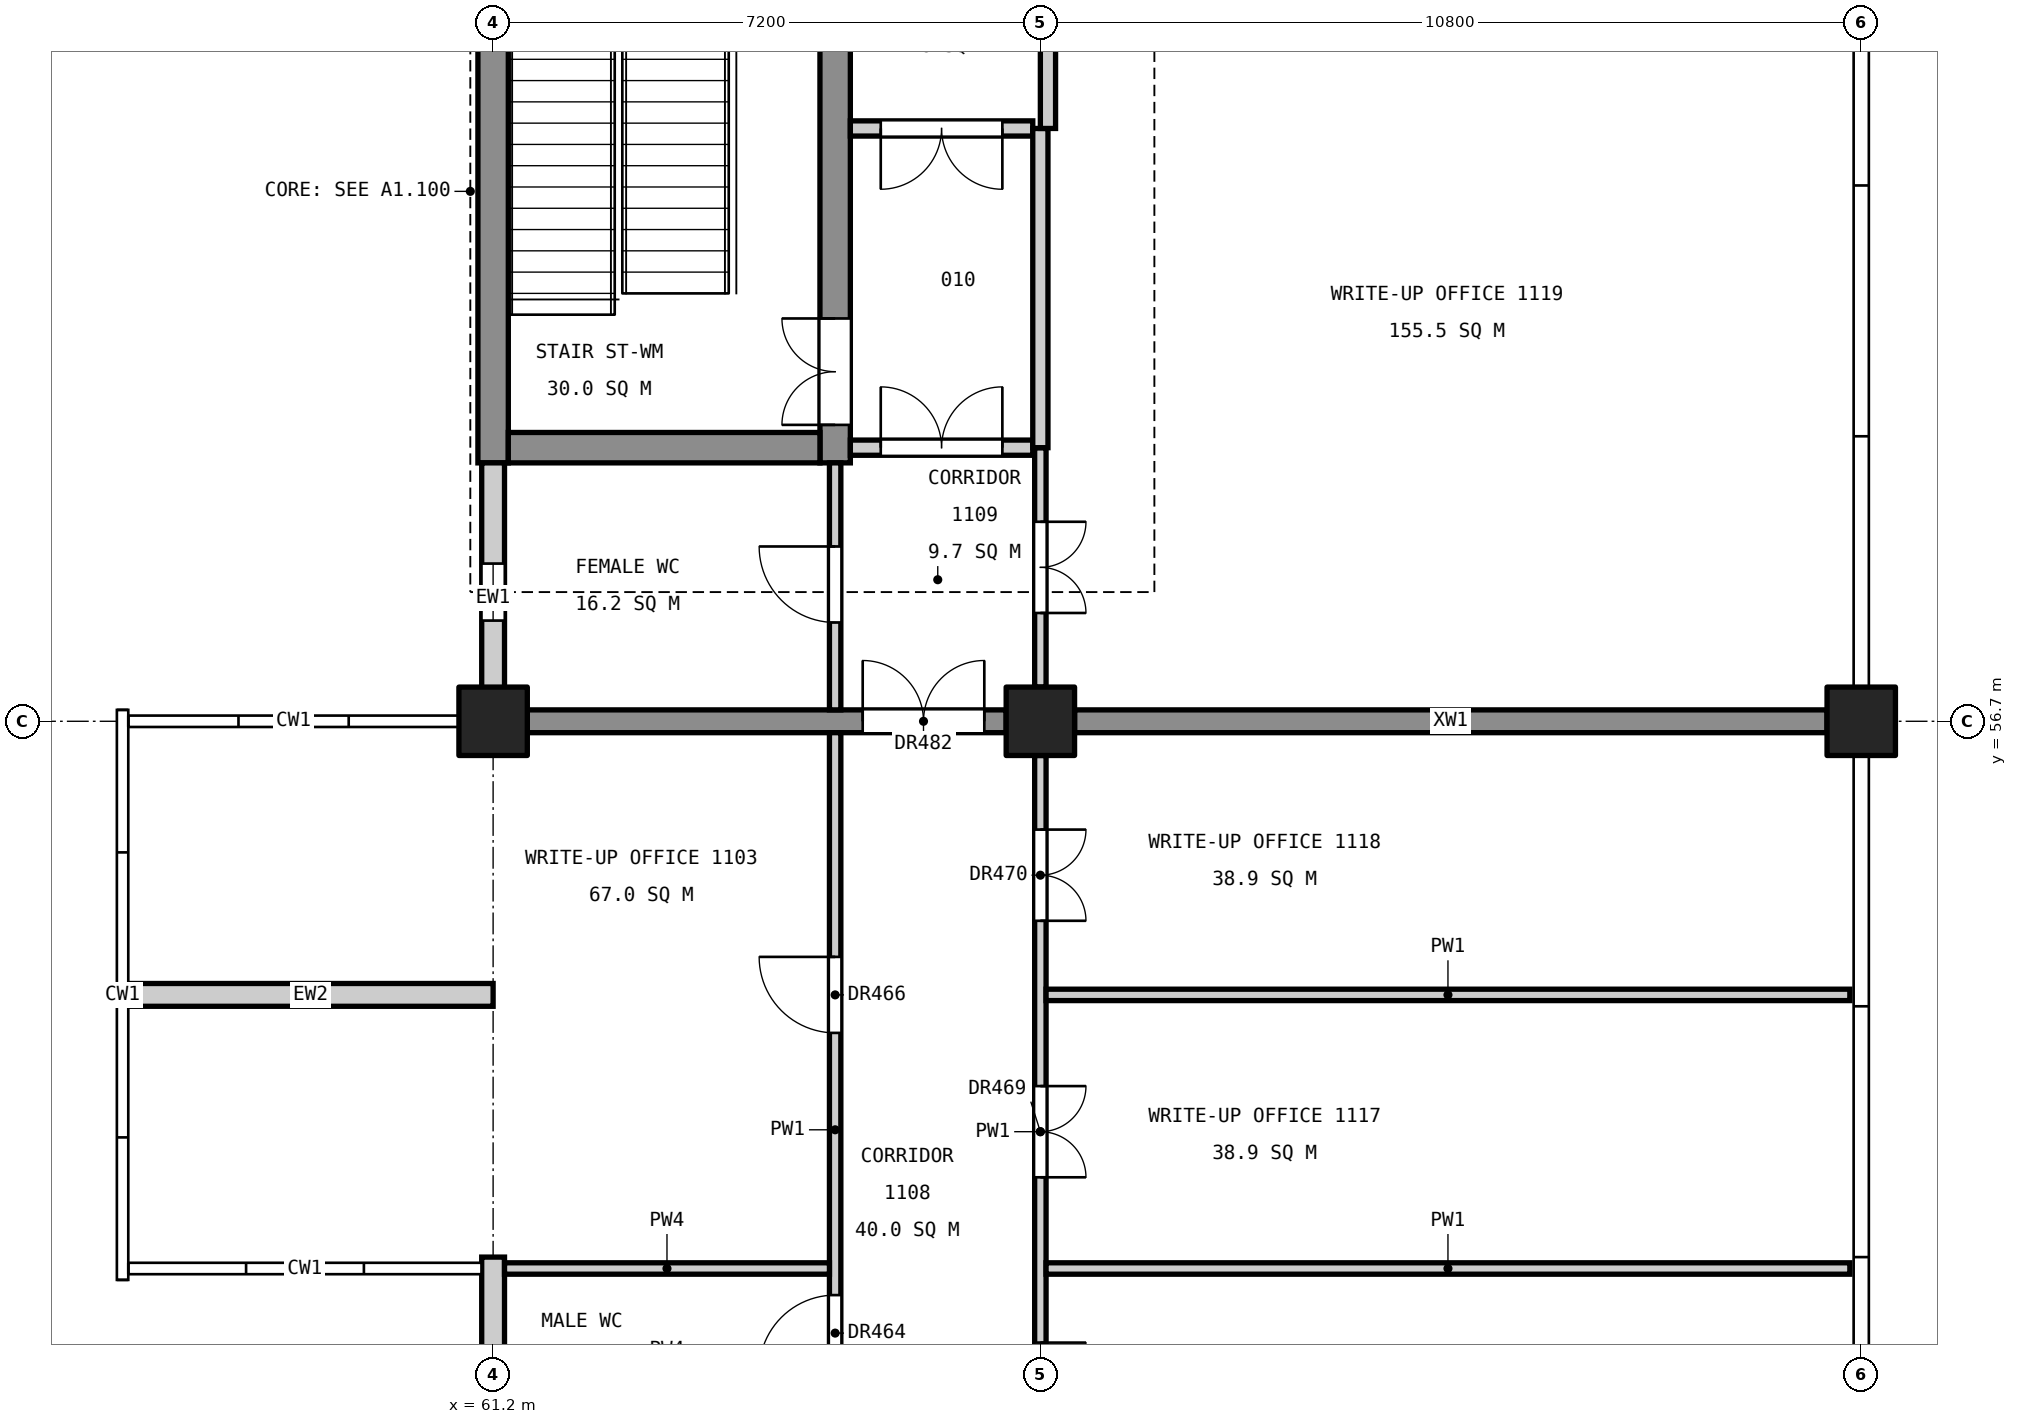
"""IFC4 building model, lengths in metres.
Left out: names, types, materials, properties, quantities, classifications, styles, units other than length and angle.
Written with IfcOpenShell. Run it as: python <this file> out.ifc"""

import sys

from ifc_helpers import new_model, si_unit, direction, frame, frame_2d, origin, origin_2d, place, context, subcontext, project, spatial, rectangle, extrude, element, fill, save


model = new_model("IFC4")
c1 = context("Model", 3, precision=1e-05, world=origin(), true_north=direction((0.0, 1.0)))
c2 = subcontext(c1, "Body", "Model", "MODEL_VIEW")
j1 = project(units=[si_unit("LENGTHUNIT", "METRE"), si_unit("PLANEANGLEUNIT", "RADIAN")], contexts=[c1])
p1 = place(None, origin())
s1 = spatial("IfcSite", under=j1, at=p1, CompositionType="ELEMENT")
p2 = place(p1, origin())
s2 = spatial("IfcBuilding", under=s1, at=p2, CompositionType="ELEMENT")
p3 = place(p2, frame((0.0, 0.0, 55.8)))
s3 = spatial("IfcBuildingStorey", under=s2, at=p3, CompositionType="ELEMENT", Elevation=55.8)
for number, where, z_axis, x_axis in (
    (1, (61.2, 56.7, 0.0), (0.0, 0.0, 1.0), (1.0, 0.0, 0.0)),
    (2, (68.4, 56.7, 0.0), (0.0, 0.0, 1.0), (1.0, 0.0, 0.0)),
    (3, (79.2, 56.7, 0.0), (0.0, 0.0, 1.0), (1.0, 0.0, 0.0)),
):
    element("IfcColumn", number, at=place(p3, frame(where, z_axis=z_axis, x_axis=x_axis)), inside=s3, PredefinedType="COLUMN", context=c2, shape_type="SweptSolid", body=[
        extrude(rectangle(XDim=0.9, YDim=0.9, at=origin_2d()), origin(), (0.0, 0.0, 1.0), 4.8),
    ])
p4 = place(p3, frame((61.2, 60.1, 0.0), z_axis=(0.0, 0.0, 1.0), x_axis=(0.0, 1.0, 0.0)))
e4 = element("IfcWall", 4, at=p4, inside=s3, PredefinedType="SHEAR", context=c2, shape_type="SweptSolid", body=[
    extrude(rectangle(XDim=14.8, YDim=0.4, at=frame_2d((7.4, 0.0))), origin(), (0.0, 0.0, 1.0), 4.55),
])
p5 = place(p4, frame((6.11, 0.0, 3.4)))
e5 = element("IfcOpeningElement", 5, at=p5, cuts=e4, PredefinedType="OPENING", context=c2, shape_type="SweptSolid", body=[
    extrude(rectangle(XDim=1.2, YDim=0.9, at=frame_2d((0.6, 0.45))), frame((0.0, 0.21, 0.0), z_axis=(0.0, -1.0, 0.0), x_axis=(1.0, 0.0, 0.0)), (0.0, 0.0, 1.0), 0.42),
])
p6 = place(p3, frame((65.7, 60.1, 0.0), z_axis=(0.0, 0.0, 1.0), x_axis=(0.0, 1.0, 0.0)))
e6 = element("IfcWall", 6, at=p6, inside=s3, PredefinedType="SHEAR", context=c2, shape_type="SweptSolid", body=[
    extrude(rectangle(XDim=14.8, YDim=0.4, at=frame_2d((7.4, 0.0))), origin(), (0.0, 0.0, 1.0), 4.55),
])
p7 = place(p6, frame((0.5, 0.0, 0.0)))
e7 = element("IfcOpeningElement", 7, at=p7, cuts=e6, PredefinedType="OPENING", context=c2, shape_type="SweptSolid", body=[
    extrude(rectangle(XDim=1.4, YDim=2.1, at=frame_2d((0.7, 1.05))), frame((0.0, 0.21, 0.0), z_axis=(0.0, -1.0, 0.0), x_axis=(1.0, 0.0, 0.0)), (0.0, 0.0, 1.0), 0.42),
])
p8 = place(p6, frame((8.8, 0.0, 0.0)))
e8 = element("IfcOpeningElement", 8, at=p8, cuts=e6, PredefinedType="OPENING", context=c2, shape_type="SweptSolid", body=[
    extrude(rectangle(XDim=1.1, YDim=2.1, at=frame_2d((0.55, 1.05))), frame((0.0, 0.21, 0.0), z_axis=(0.0, -1.0, 0.0), x_axis=(1.0, 0.0, 0.0)), (0.0, 0.0, 1.0), 0.42),
])
p9 = place(p6, frame((11.35, 0.0, 0.0)))
e9 = element("IfcOpeningElement", 9, at=p9, cuts=e6, PredefinedType="OPENING", context=c2, shape_type="SweptSolid", body=[
    extrude(rectangle(XDim=1.1, YDim=2.1, at=frame_2d((0.55, 1.05))), frame((0.0, 0.21, 0.0), z_axis=(0.0, -1.0, 0.0), x_axis=(1.0, 0.0, 0.0)), (0.0, 0.0, 1.0), 0.42),
])
p10 = place(p3, frame((61.4, 60.3, 0.0), z_axis=(0.0, 0.0, 1.0), x_axis=(1.0, 0.0, 0.0)))
e10 = element("IfcWall", 10, at=p10, inside=s3, PredefinedType="SHEAR", context=c2, shape_type="SweptSolid", body=[
    extrude(rectangle(XDim=4.1, YDim=0.4, at=frame_2d((2.05, 0.0))), origin(), (0.0, 0.0, 1.0), 4.55),
])
p11 = place(p3, frame((61.65, 56.7, 0.0), z_axis=(0.0, 0.0, 1.0), x_axis=(1.0, 0.0, 0.0)))
e11 = element("IfcWall", 11, at=p11, inside=s3, PredefinedType="SHEAR", context=c2, shape_type="SweptSolid", body=[
    extrude(rectangle(XDim=6.3, YDim=0.3, at=frame_2d((3.15, 0.0))), origin(), (0.0, 0.0, 1.0), 4.55),
])
p12 = place(p11, frame((4.413, 0.0, 0.0)))
e12 = element("IfcOpeningElement", 12, at=p12, cuts=e11, PredefinedType="OPENING", context=c2, shape_type="SweptSolid", body=[
    extrude(rectangle(XDim=1.6, YDim=2.1, at=frame_2d((0.8, 1.05))), frame((0.0, 0.16, 0.0), z_axis=(0.0, -1.0, 0.0), x_axis=(1.0, 0.0, 0.0)), (0.0, 0.0, 1.0), 0.32),
])
p13 = place(p3, frame((68.85, 56.7, 0.0), z_axis=(0.0, 0.0, 1.0), x_axis=(1.0, 0.0, 0.0)))
e13 = element("IfcWall", 13, at=p13, inside=s3, PredefinedType="SHEAR", context=c2, shape_type="SweptSolid", body=[
    extrude(rectangle(XDim=9.9, YDim=0.3, at=frame_2d((4.95, 0.0))), origin(), (0.0, 0.0, 1.0), 4.55),
])
p14 = place(p3, frame((61.2, 46.1, 0.0), z_axis=(0.0, 0.0, 1.0), x_axis=(0.0, 1.0, 0.0)))
e14 = element("IfcWall", 14, at=p14, inside=s3, PredefinedType="STANDARD", context=c2, shape_type="SweptSolid", body=[
    extrude(rectangle(XDim=3.55, YDim=0.3, at=frame_2d((1.775, 0.0))), origin(), (0.0, 0.0, 1.0), 3.65),
])
p15 = place(p3, frame((61.2, 56.55, 0.0), z_axis=(0.0, 0.0, 1.0), x_axis=(0.0, 1.0, 0.0)))
e15 = element("IfcWall", 15, at=p15, inside=s3, PredefinedType="STANDARD", context=c2, shape_type="SweptSolid", body=[
    extrude(rectangle(XDim=3.55, YDim=0.3, at=frame_2d((1.775, 0.0))), origin(), (0.0, 0.0, 1.0), 3.65),
])
p16 = place(p15, frame((1.475, 0.0, 0.8)))
e16 = element("IfcOpeningElement", 16, at=p16, cuts=e15, PredefinedType="OPENING", context=c2, shape_type="SweptSolid", body=[
    extrude(rectangle(XDim=0.75, YDim=1.2, at=frame_2d((0.375, 0.6))), frame((0.0, 0.16, 0.0), z_axis=(0.0, -1.0, 0.0), x_axis=(1.0, 0.0, 0.0)), (0.0, 0.0, 1.0), 0.32),
])
p17 = place(p3, frame((56.4, 53.1, 0.0), z_axis=(0.0, 0.0, 1.0), x_axis=(1.0, 0.0, 0.0)))
e17 = element("IfcWall", 17, at=p17, inside=s3, PredefinedType="STANDARD", context=c2, shape_type="SweptSolid", body=[
    extrude(rectangle(XDim=4.8, YDim=0.3, at=frame_2d((2.4, 0.0))), origin(), (0.0, 0.0, 1.0), 3.65),
])
p18 = place(p3, frame((65.7, 46.1, 0.0), z_axis=(0.0, 0.0, 1.0), x_axis=(0.0, 1.0, 0.0)))
e18 = element("IfcWall", 18, at=p18, inside=s3, PredefinedType="PARTITIONING", context=c2, shape_type="SweptSolid", body=[
    extrude(rectangle(XDim=10.45, YDim=0.15, at=frame_2d((5.225, 0.0))), origin(), (0.0, 0.0, 1.0), 3.55),
])
p19 = place(p18, frame((0.25, 0.0, 0.0)))
e19 = element("IfcOpeningElement", 19, at=p19, cuts=e18, PredefinedType="OPENING", context=c2, shape_type="SweptSolid", body=[
    extrude(rectangle(XDim=1.0, YDim=2.1, at=frame_2d((0.5, 1.05))), frame((0.0, 0.085, 0.0), z_axis=(0.0, -1.0, 0.0), x_axis=(1.0, 0.0, 0.0)), (0.0, 0.0, 1.0), 0.17),
])
p20 = place(p18, frame((2.05, 0.0, 0.0)))
e20 = element("IfcOpeningElement", 20, at=p20, cuts=e18, PredefinedType="OPENING", context=c2, shape_type="SweptSolid", body=[
    extrude(rectangle(XDim=1.0, YDim=2.1, at=frame_2d((0.5, 1.05))), frame((0.0, 0.085, 0.0), z_axis=(0.0, -1.0, 0.0), x_axis=(1.0, 0.0, 0.0)), (0.0, 0.0, 1.0), 0.17),
])
p21 = place(p18, frame((6.5, 0.0, 0.0)))
e21 = element("IfcOpeningElement", 21, at=p21, cuts=e18, PredefinedType="OPENING", context=c2, shape_type="SweptSolid", body=[
    extrude(rectangle(XDim=1.0, YDim=2.1, at=frame_2d((0.5, 1.05))), frame((0.0, 0.085, 0.0), z_axis=(0.0, -1.0, 0.0), x_axis=(1.0, 0.0, 0.0)), (0.0, 0.0, 1.0), 0.17),
])
p22 = place(p3, frame((65.7, 56.85, 0.0), z_axis=(0.0, 0.0, 1.0), x_axis=(0.0, 1.0, 0.0)))
e22 = element("IfcWall", 22, at=p22, inside=s3, PredefinedType="PARTITIONING", context=c2, shape_type="SweptSolid", body=[
    extrude(rectangle(XDim=3.25, YDim=0.15, at=frame_2d((1.625, 0.0))), origin(), (0.0, 0.0, 1.0), 3.55),
])
p23 = place(p22, frame((1.15, 0.0, 0.0)))
e23 = element("IfcOpeningElement", 23, at=p23, cuts=e22, PredefinedType="OPENING", context=c2, shape_type="SweptSolid", body=[
    extrude(rectangle(XDim=1.0, YDim=2.1, at=frame_2d((0.5, 1.05))), frame((0.0, 0.085, 0.0), z_axis=(0.0, -1.0, 0.0), x_axis=(1.0, 0.0, 0.0)), (0.0, 0.0, 1.0), 0.17),
])
p24 = place(p3, frame((61.35, 49.5, 0.0), z_axis=(0.0, 0.0, 1.0), x_axis=(1.0, 0.0, 0.0)))
e24 = element("IfcWall", 24, at=p24, inside=s3, PredefinedType="PARTITIONING", context=c2, shape_type="SweptSolid", body=[
    extrude(rectangle(XDim=4.275, YDim=0.15, at=frame_2d((2.137, 0.0))), origin(), (0.0, 0.0, 1.0), 3.85),
])
p25 = place(p3, frame((65.9, 60.3, 0.0), z_axis=(0.0, 0.0, 1.0), x_axis=(1.0, 0.0, 0.0)))
e25 = element("IfcWall", 25, at=p25, inside=s3, PredefinedType="PARTITIONING", context=c2, shape_type="SweptSolid", body=[
    extrude(rectangle(XDim=2.4, YDim=0.2, at=frame_2d((1.2, 0.0))), origin(), (0.0, 0.0, 1.0), 3.85),
])
p26 = place(p25, frame((0.4, 0.0, 0.0)))
e26 = element("IfcOpeningElement", 26, at=p26, cuts=e25, PredefinedType="OPENING", context=c2, shape_type="SweptSolid", body=[
    extrude(rectangle(XDim=1.6, YDim=2.1, at=frame_2d((0.8, 1.05))), frame((0.0, 0.11, 0.0), z_axis=(0.0, -1.0, 0.0), x_axis=(1.0, 0.0, 0.0)), (0.0, 0.0, 1.0), 0.22),
])
p27 = place(p3, frame((65.9, 64.5, 0.0), z_axis=(0.0, 0.0, 1.0), x_axis=(1.0, 0.0, 0.0)))
e27 = element("IfcWall", 27, at=p27, inside=s3, PredefinedType="PARTITIONING", context=c2, shape_type="SweptSolid", body=[
    extrude(rectangle(XDim=2.4, YDim=0.2, at=frame_2d((1.2, 0.0))), origin(), (0.0, 0.0, 1.0), 3.55),
])
p28 = place(p27, frame((0.4, 0.0, 0.0)))
e28 = element("IfcOpeningElement", 28, at=p28, cuts=e27, PredefinedType="OPENING", context=c2, shape_type="SweptSolid", body=[
    extrude(rectangle(XDim=1.6, YDim=2.1, at=frame_2d((0.8, 1.05))), frame((0.0, 0.11, 0.0), z_axis=(0.0, -1.0, 0.0), x_axis=(1.0, 0.0, 0.0)), (0.0, 0.0, 1.0), 0.22),
])
p29 = place(p3, frame((68.4, 46.35, 0.0), z_axis=(0.0, 0.0, 1.0), x_axis=(0.0, 1.0, 0.0)))
e29 = element("IfcWall", 29, at=p29, inside=s3, PredefinedType="PARTITIONING", context=c2, shape_type="SweptSolid", body=[
    extrude(rectangle(XDim=9.9, YDim=0.15, at=frame_2d((4.95, 0.0))), origin(), (0.0, 0.0, 1.0), 3.55),
])
p30 = place(p29, frame((0.975, 0.0, 0.0)))
e30 = element("IfcOpeningElement", 30, at=p30, cuts=e29, PredefinedType="OPENING", context=c2, shape_type="SweptSolid", body=[
    extrude(rectangle(XDim=1.2, YDim=2.1, at=frame_2d((0.6, 1.05))), frame((0.0, 0.085, 0.0), z_axis=(0.0, -1.0, 0.0), x_axis=(1.0, 0.0, 0.0)), (0.0, 0.0, 1.0), 0.17),
])
p31 = place(p29, frame((4.35, 0.0, 0.0)))
e31 = element("IfcOpeningElement", 31, at=p31, cuts=e29, PredefinedType="OPENING", context=c2, shape_type="SweptSolid", body=[
    extrude(rectangle(XDim=1.2, YDim=2.1, at=frame_2d((0.6, 1.05))), frame((0.0, 0.085, 0.0), z_axis=(0.0, -1.0, 0.0), x_axis=(1.0, 0.0, 0.0)), (0.0, 0.0, 1.0), 0.17),
])
p32 = place(p29, frame((7.725, 0.0, 0.0)))
e32 = element("IfcOpeningElement", 32, at=p32, cuts=e29, PredefinedType="OPENING", context=c2, shape_type="SweptSolid", body=[
    extrude(rectangle(XDim=1.2, YDim=2.1, at=frame_2d((0.6, 1.05))), frame((0.0, 0.085, 0.0), z_axis=(0.0, -1.0, 0.0), x_axis=(1.0, 0.0, 0.0)), (0.0, 0.0, 1.0), 0.17),
])
p33 = place(p3, frame((68.4, 57.15, 0.0), z_axis=(0.0, 0.0, 1.0), x_axis=(0.0, 1.0, 0.0)))
e33 = element("IfcWall", 33, at=p33, inside=s3, PredefinedType="PARTITIONING", context=c2, shape_type="SweptSolid", body=[
    extrude(rectangle(XDim=3.15, YDim=0.15, at=frame_2d((1.575, 0.0))), origin(), (0.0, 0.0, 1.0), 3.55),
])
p34 = place(p33, frame((0.975, 0.0, 0.0)))
e34 = element("IfcOpeningElement", 34, at=p34, cuts=e33, PredefinedType="OPENING", context=c2, shape_type="SweptSolid", body=[
    extrude(rectangle(XDim=1.2, YDim=2.1, at=frame_2d((0.6, 1.05))), frame((0.0, 0.085, 0.0), z_axis=(0.0, -1.0, 0.0), x_axis=(1.0, 0.0, 0.0)), (0.0, 0.0, 1.0), 0.17),
])
p35 = place(p3, frame((68.4, 60.3, 0.0), z_axis=(0.0, 0.0, 1.0), x_axis=(0.0, 1.0, 0.0)))
e35 = element("IfcWall", 35, at=p35, inside=s3, PredefinedType="PARTITIONING", context=c2, shape_type="SweptSolid", body=[
    extrude(rectangle(XDim=4.2, YDim=0.2, at=frame_2d((2.1, 0.0))), origin(), (0.0, 0.0, 1.0), 3.55),
])
p36 = place(p3, frame((68.5, 64.5, 0.0), z_axis=(0.0, 0.0, 1.0), x_axis=(0.0, 1.0, 0.0)))
e36 = element("IfcWall", 36, at=p36, inside=s3, PredefinedType="PARTITIONING", context=c2, shape_type="SweptSolid", body=[
    extrude(rectangle(XDim=2.55, YDim=0.2, at=frame_2d((1.275, 0.0))), origin(), (0.0, 0.0, 1.0), 3.55),
])
for number, where, z_axis, x_axis in (
    (37, (68.475, 49.5, 0.0), (0.0, 0.0, 1.0), (1.0, 0.0, 0.0)),
    (38, (68.475, 53.1, 0.0), (0.0, 0.0, 1.0), (1.0, 0.0, 0.0)),
):
    element("IfcWall", number, at=place(p3, frame(where, z_axis=z_axis, x_axis=x_axis)), inside=s3, PredefinedType="PARTITIONING", context=c2, shape_type="SweptSolid", body=[
        extrude(rectangle(XDim=10.575, YDim=0.15, at=frame_2d((5.288, 0.0))), origin(), (0.0, 0.0, 1.0), 3.85),
    ])
p37 = place(p7, origin())
e39 = element("IfcDoor", 39, at=p37, inside=s3, OperationType="DOUBLE_DOOR_SINGLE_SWING", PredefinedType="DOOR", context=c2, shape_type="SweptSolid", body=[
    extrude(rectangle(XDim=1.4, YDim=2.1, at=frame_2d((0.7, 1.05))), frame((0.0, 0.025, 0.0), z_axis=(0.0, -1.0, 0.0), x_axis=(1.0, 0.0, 0.0)), (0.0, 0.0, 1.0), 0.05),
])
fill(e7, e39)
p38 = place(p16, origin())
e40 = element("IfcWindow", 40, at=p38, inside=s3, PartitioningType="SINGLE_PANEL", PredefinedType="WINDOW", context=c2, shape_type="SweptSolid", body=[
    extrude(rectangle(XDim=0.75, YDim=1.2, at=frame_2d((0.375, 0.6))), frame((0.0, 0.03, 0.0), z_axis=(0.0, -1.0, 0.0), x_axis=(1.0, 0.0, 0.0)), (0.0, 0.0, 1.0), 0.06),
])
fill(e16, e40)
p39 = place(p23, origin())
e41 = element("IfcDoor", 41, at=p39, inside=s3, OperationType="SINGLE_SWING_RIGHT", PredefinedType="DOOR", context=c2, shape_type="SweptSolid", body=[
    extrude(rectangle(XDim=1.0, YDim=2.1, at=frame_2d((0.5, 1.05))), frame((0.0, 0.025, 0.0), z_axis=(0.0, -1.0, 0.0), x_axis=(1.0, 0.0, 0.0)), (0.0, 0.0, 1.0), 0.05),
])
fill(e23, e41)
p40 = place(p20, origin())
e42 = element("IfcDoor", 42, at=p40, inside=s3, OperationType="SINGLE_SWING_LEFT", PredefinedType="DOOR", context=c2, shape_type="SweptSolid", body=[
    extrude(rectangle(XDim=1.0, YDim=2.1, at=frame_2d((0.5, 1.05))), frame((0.0, 0.025, 0.0), z_axis=(0.0, -1.0, 0.0), x_axis=(1.0, 0.0, 0.0)), (0.0, 0.0, 1.0), 0.05),
])
fill(e20, e42)
p41 = place(p21, origin())
e43 = element("IfcDoor", 43, at=p41, inside=s3, OperationType="SINGLE_SWING_RIGHT", PredefinedType="DOOR", context=c2, shape_type="SweptSolid", body=[
    extrude(rectangle(XDim=1.0, YDim=2.1, at=frame_2d((0.5, 1.05))), frame((0.0, 0.025, 0.0), z_axis=(0.0, -1.0, 0.0), x_axis=(1.0, 0.0, 0.0)), (0.0, 0.0, 1.0), 0.05),
])
fill(e21, e43)
p42 = place(p30, frame((1.2, 0.0, 0.0), z_axis=(0.0, 0.0, 1.0), x_axis=(-1.0, 0.0, 0.0)))
e44 = element("IfcDoor", 44, at=p42, inside=s3, OperationType="DOUBLE_DOOR_SINGLE_SWING", PredefinedType="DOOR", context=c2, shape_type="SweptSolid", body=[
    extrude(rectangle(XDim=1.2, YDim=2.1, at=frame_2d((0.6, 1.05))), frame((0.0, 0.025, 0.0), z_axis=(0.0, -1.0, 0.0), x_axis=(1.0, 0.0, 0.0)), (0.0, 0.0, 1.0), 0.05),
])
fill(e30, e44)
p43 = place(p31, frame((1.2, 0.0, 0.0), z_axis=(0.0, 0.0, 1.0), x_axis=(-1.0, 0.0, 0.0)))
e45 = element("IfcDoor", 45, at=p43, inside=s3, OperationType="DOUBLE_DOOR_SINGLE_SWING", PredefinedType="DOOR", context=c2, shape_type="SweptSolid", body=[
    extrude(rectangle(XDim=1.2, YDim=2.1, at=frame_2d((0.6, 1.05))), frame((0.0, 0.025, 0.0), z_axis=(0.0, -1.0, 0.0), x_axis=(1.0, 0.0, 0.0)), (0.0, 0.0, 1.0), 0.05),
])
fill(e31, e45)
p44 = place(p32, frame((1.2, 0.0, 0.0), z_axis=(0.0, 0.0, 1.0), x_axis=(-1.0, 0.0, 0.0)))
e46 = element("IfcDoor", 46, at=p44, inside=s3, OperationType="DOUBLE_DOOR_SINGLE_SWING", PredefinedType="DOOR", context=c2, shape_type="SweptSolid", body=[
    extrude(rectangle(XDim=1.2, YDim=2.1, at=frame_2d((0.6, 1.05))), frame((0.0, 0.025, 0.0), z_axis=(0.0, -1.0, 0.0), x_axis=(1.0, 0.0, 0.0)), (0.0, 0.0, 1.0), 0.05),
])
fill(e32, e46)
p45 = place(p34, frame((1.2, 0.0, 0.0), z_axis=(0.0, 0.0, 1.0), x_axis=(-1.0, 0.0, 0.0)))
e47 = element("IfcDoor", 47, at=p45, inside=s3, OperationType="DOUBLE_DOOR_SINGLE_SWING", PredefinedType="DOOR", context=c2, shape_type="SweptSolid", body=[
    extrude(rectangle(XDim=1.2, YDim=2.1, at=frame_2d((0.6, 1.05))), frame((0.0, 0.025, 0.0), z_axis=(0.0, -1.0, 0.0), x_axis=(1.0, 0.0, 0.0)), (0.0, 0.0, 1.0), 0.05),
])
fill(e34, e47)
p46 = place(p26, origin())
e48 = element("IfcDoor", 48, at=p46, inside=s3, OperationType="DOUBLE_DOOR_SINGLE_SWING", PredefinedType="DOOR", context=c2, shape_type="SweptSolid", body=[
    extrude(rectangle(XDim=1.6, YDim=2.1, at=frame_2d((0.8, 1.05))), frame((0.0, 0.025, 0.0), z_axis=(0.0, -1.0, 0.0), x_axis=(1.0, 0.0, 0.0)), (0.0, 0.0, 1.0), 0.05),
])
fill(e26, e48)
p47 = place(p28, frame((1.6, 0.0, 0.0), z_axis=(0.0, 0.0, 1.0), x_axis=(-1.0, 0.0, 0.0)))
e49 = element("IfcDoor", 49, at=p47, inside=s3, OperationType="DOUBLE_DOOR_SINGLE_SWING", PredefinedType="DOOR", context=c2, shape_type="SweptSolid", body=[
    extrude(rectangle(XDim=1.6, YDim=2.1, at=frame_2d((0.8, 1.05))), frame((0.0, 0.025, 0.0), z_axis=(0.0, -1.0, 0.0), x_axis=(1.0, 0.0, 0.0)), (0.0, 0.0, 1.0), 0.05),
])
fill(e28, e49)
p48 = place(p12, origin())
e50 = element("IfcDoor", 50, at=p48, inside=s3, OperationType="DOUBLE_DOOR_SINGLE_SWING", PredefinedType="DOOR", context=c2, shape_type="SweptSolid", body=[
    extrude(rectangle(XDim=1.6, YDim=2.1, at=frame_2d((0.8, 1.05))), frame((0.0, 0.025, 0.0), z_axis=(0.0, -1.0, 0.0), x_axis=(1.0, 0.0, 0.0)), (0.0, 0.0, 1.0), 0.05),
])
fill(e12, e50)
save(model, sys.argv[1])
